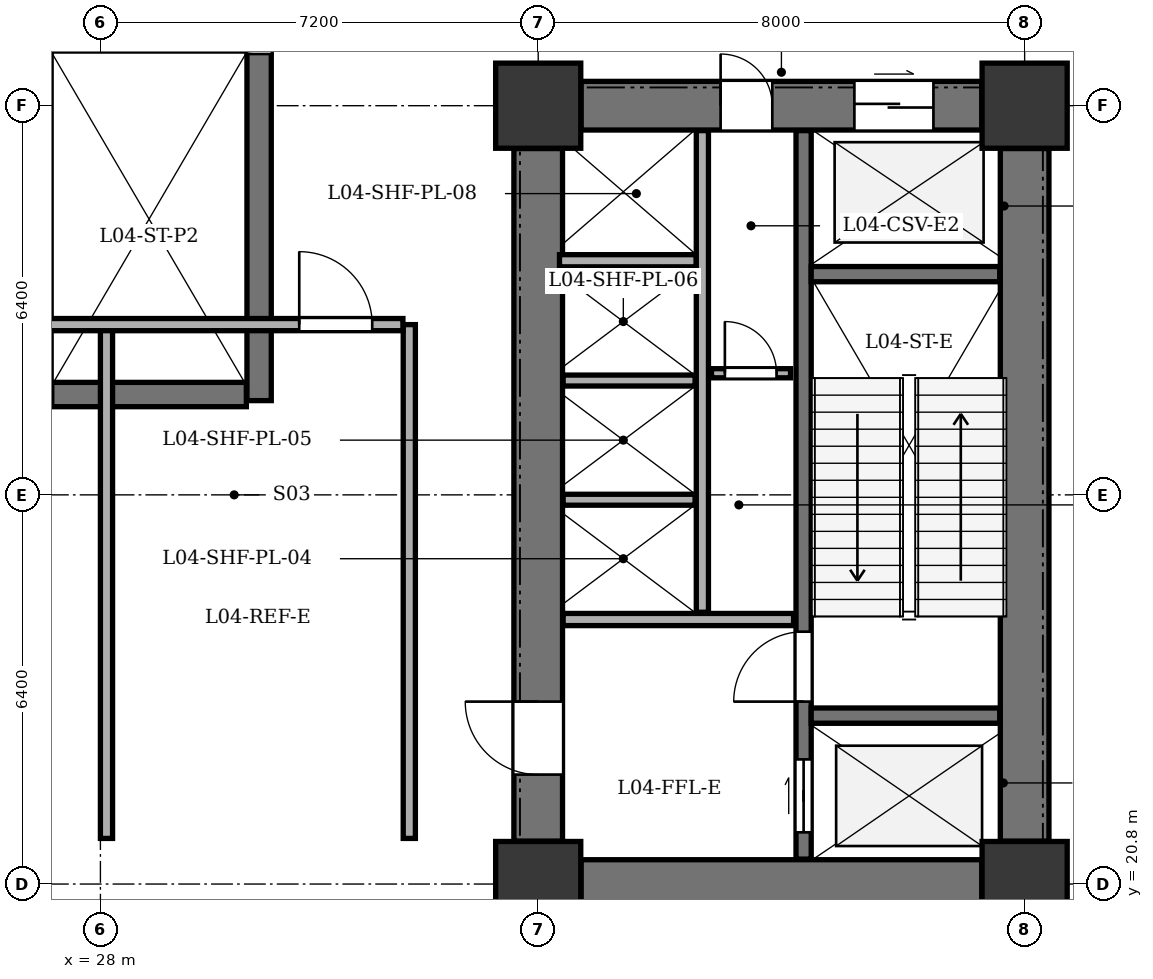
"""IFC4 building model, lengths in metres.
Left out: names, types, materials, properties, quantities, classifications, styles, units other than length and angle.
Written with IfcOpenShell. Run it as: python <this file> out.ifc"""

import sys

from ifc_helpers import new_model, si_unit, direction, frame, frame_2d, origin, origin_2d, place, context, subcontext, project, spatial, rectangle, extrude, element, fill, save


model = new_model("IFC4")
c1 = context("Model", 3, precision=1e-05, world=origin(), true_north=direction((0.0, 1.0)))
c2 = subcontext(c1, "Body", "Model", "MODEL_VIEW")
j1 = project(units=[si_unit("LENGTHUNIT", "METRE"), si_unit("PLANEANGLEUNIT", "RADIAN")], contexts=[c1])
p1 = place(None, origin())
s1 = spatial("IfcSite", under=j1, at=p1, CompositionType="ELEMENT")
p2 = place(p1, origin())
s2 = spatial("IfcBuilding", under=s1, at=p2, CompositionType="ELEMENT")
p3 = place(p2, frame((0.0, 0.0, 18.9)))
s3 = spatial("IfcBuildingStorey", under=s2, at=p3, CompositionType="ELEMENT", Elevation=18.9)
for number, where, z_axis, x_axis in (
    (1, (35.2, 20.8, 0.0), (0.0, 0.0, 1.0), (1.0, 0.0, 0.0)),
    (2, (43.2, 20.8, 0.0), (0.0, 0.0, 1.0), (1.0, 0.0, 0.0)),
    (3, (35.2, 33.6, 0.0), (0.0, 0.0, 1.0), (1.0, 0.0, 0.0)),
    (4, (43.2, 33.6, 0.0), (0.0, 0.0, 1.0), (1.0, 0.0, 0.0)),
):
    element("IfcColumn", number, at=place(p3, frame(where, z_axis=z_axis, x_axis=x_axis)), inside=s3, PredefinedType="COLUMN", context=c2, shape_type="SweptSolid", body=[
        extrude(rectangle(XDim=1.4, YDim=1.4, at=origin_2d()), origin(), (0.0, 0.0, 1.0), 5.4),
    ])
p4 = place(p3, frame((43.2, 21.505, 0.0), z_axis=(0.0, 0.0, 1.0), x_axis=(0.0, 1.0, 0.0)))
e5 = element("IfcWall", 5, at=p4, inside=s3, PredefinedType="SHEAR", context=c2, shape_type="SweptSolid", body=[
    extrude(rectangle(XDim=11.39, YDim=0.8, at=frame_2d((5.695, 0.0))), origin(), (0.0, 0.0, 1.0), 4.95),
])
p5 = place(p3, frame((35.905, 20.8, 0.0), z_axis=(0.0, 0.0, 1.0), x_axis=(1.0, 0.0, 0.0)))
e6 = element("IfcWall", 6, at=p5, inside=s3, PredefinedType="SHEAR", context=c2, shape_type="SweptSolid", body=[
    extrude(rectangle(XDim=6.59, YDim=0.8, at=frame_2d((3.295, 0.0))), origin(), (0.0, 0.0, 1.0), 4.95),
])
p6 = place(p3, frame((35.905, 33.6, 0.0), z_axis=(0.0, 0.0, 1.0), x_axis=(1.0, 0.0, 0.0)))
e7 = element("IfcWall", 7, at=p6, inside=s3, PredefinedType="SHEAR", context=c2, shape_type="SweptSolid", body=[
    extrude(rectangle(XDim=6.59, YDim=0.8, at=frame_2d((3.295, 0.0))), origin(), (0.0, 0.0, 1.0), 4.95),
])
p7 = place(p6, frame((4.495, 0.0, 0.0)))
e8 = element("IfcOpeningElement", 8, at=p7, cuts=e7, PredefinedType="OPENING", context=c2, shape_type="SweptSolid", body=[
    extrude(rectangle(XDim=1.3, YDim=2.15, at=frame_2d((0.65, 1.075))), frame((0.0, 0.41, 0.0), z_axis=(0.0, -1.0, 0.0), x_axis=(1.0, 0.0, 0.0)), (0.0, 0.0, 1.0), 0.82),
])
p8 = place(p6, frame((2.295, 0.0, 0.0)))
e9 = element("IfcOpeningElement", 9, at=p8, cuts=e7, PredefinedType="OPENING", context=c2, shape_type="SweptSolid", body=[
    extrude(rectangle(XDim=0.85, YDim=2.02, at=frame_2d((0.425, 1.01))), frame((0.0, 0.41, 0.0), z_axis=(0.0, -1.0, 0.0), x_axis=(1.0, 0.0, 0.0)), (0.0, 0.0, 1.0), 0.82),
])
p9 = place(p3, frame((35.2, 21.505, 0.0), z_axis=(0.0, 0.0, 1.0), x_axis=(0.0, 1.0, 0.0)))
e10 = element("IfcWall", 10, at=p9, inside=s3, PredefinedType="SHEAR", context=c2, shape_type="SweptSolid", body=[
    extrude(rectangle(XDim=11.39, YDim=0.8, at=frame_2d((5.695, 0.0))), origin(), (0.0, 0.0, 1.0), 4.95),
])
p10 = place(p9, frame((1.095, 0.0, 0.0)))
e11 = element("IfcOpeningElement", 11, at=p10, cuts=e10, PredefinedType="OPENING", context=c2, shape_type="SweptSolid", body=[
    extrude(rectangle(XDim=1.2, YDim=2.15, at=frame_2d((0.6, 1.075))), frame((0.0, 0.41, 0.0), z_axis=(0.0, -1.0, 0.0), x_axis=(1.0, 0.0, 0.0)), (0.0, 0.0, 1.0), 0.82),
])
p11 = place(p3, frame((39.565, 21.21, 0.0), z_axis=(0.0, 0.0, 1.0), x_axis=(0.0, 1.0, 0.0)))
e12 = element("IfcWall", 12, at=p11, inside=s3, PredefinedType="SHEAR", context=c2, shape_type="SweptSolid", body=[
    extrude(rectangle(XDim=11.98, YDim=0.25, at=frame_2d((5.99, 0.0))), origin(), (0.0, 0.0, 1.0), 4.95),
])
p12 = place(p11, frame((0.44, 0.0, 0.0)))
e13 = element("IfcOpeningElement", 13, at=p12, cuts=e12, PredefinedType="OPENING", context=c2, shape_type="SweptSolid", body=[
    extrude(rectangle(XDim=1.2, YDim=2.15, at=frame_2d((0.6, 1.075))), frame((0.0, 0.135, 0.0), z_axis=(0.0, -1.0, 0.0), x_axis=(1.0, 0.0, 0.0)), (0.0, 0.0, 1.0), 0.27),
])
p13 = place(p11, frame((2.59, 0.0, 0.0)))
e14 = element("IfcOpeningElement", 14, at=p13, cuts=e12, PredefinedType="OPENING", context=c2, shape_type="SweptSolid", body=[
    extrude(rectangle(XDim=1.15, YDim=2.15, at=frame_2d((0.575, 1.075))), frame((0.0, 0.135, 0.0), z_axis=(0.0, -1.0, 0.0), x_axis=(1.0, 0.0, 0.0)), (0.0, 0.0, 1.0), 0.27),
])
for number, where, z_axis, x_axis in (
    (15, (39.69, 23.57, 0.0), (0.0, 0.0, 1.0), (1.0, 0.0, 0.0)),
    (16, (39.69, 30.83, 0.0), (0.0, 0.0, 1.0), (1.0, 0.0, 0.0)),
):
    element("IfcWall", number, at=place(p3, frame(where, z_axis=z_axis, x_axis=x_axis)), inside=s3, PredefinedType="SHEAR", context=c2, shape_type="SweptSolid", body=[
        extrude(rectangle(XDim=3.1, YDim=0.25, at=frame_2d((1.55, 0.0))), origin(), (0.0, 0.0, 1.0), 4.95),
    ])
p14 = place(p3, frame((35.61, 25.15, 0.0), z_axis=(0.0, 0.0, 1.0), x_axis=(1.0, 0.0, 0.0)))
e17 = element("IfcWall", 17, at=p14, inside=s3, PredefinedType="SOLIDWALL", context=c2, shape_type="SweptSolid", body=[
    extrude(rectangle(XDim=3.79, YDim=0.2, at=frame_2d((1.895, 0.0))), origin(), (0.0, 0.0, 1.0), 4.95),
])
p15 = place(p3, frame((35.55, 31.05, 0.0), z_axis=(0.0, 0.0, 1.0), x_axis=(1.0, 0.0, 0.0)))
e18 = element("IfcWall", 18, at=p15, inside=s3, PredefinedType="SOLIDWALL", context=c2, shape_type="SweptSolid", body=[
    extrude(rectangle(XDim=2.25, YDim=0.2, at=frame_2d((1.125, 0.0))), origin(), (0.0, 0.0, 1.0), 4.95),
])
p16 = place(p3, frame((37.9, 25.27, 0.0), z_axis=(0.0, 0.0, 1.0), x_axis=(0.0, 1.0, 0.0)))
e19 = element("IfcWall", 19, at=p16, inside=s3, PredefinedType="SOLIDWALL", context=c2, shape_type="SweptSolid", body=[
    extrude(rectangle(XDim=7.92, YDim=0.2, at=frame_2d((3.96, 0.0))), origin(), (0.0, 0.0, 1.0), 4.95),
])
for number, where, z_axis, x_axis in (
    (20, (35.61, 27.12, 0.0), (0.0, 0.0, 1.0), (1.0, 0.0, 0.0)),
    (21, (35.61, 29.08, 0.0), (0.0, 0.0, 1.0), (1.0, 0.0, 0.0)),
):
    element("IfcWall", number, at=place(p3, frame(where, z_axis=z_axis, x_axis=x_axis)), inside=s3, PredefinedType="PARTITIONING", context=c2, shape_type="SweptSolid", body=[
        extrude(rectangle(XDim=2.17, YDim=0.18, at=frame_2d((1.085, 0.0))), origin(), (0.0, 0.0, 1.0), 4.95),
    ])
p17 = place(p3, frame((30.61, 28.75, 0.0), z_axis=(0.0, 0.0, 1.0), x_axis=(0.0, 1.0, 0.0)))
e22 = element("IfcWall", 22, at=p17, inside=s3, PredefinedType="SHEAR", context=c2, shape_type="SweptSolid", body=[
    extrude(rectangle(XDim=7.6, YDim=0.4, at=frame_2d((3.8, 0.0))), origin(), (0.0, 0.0, 1.0), 4.95),
])
p18 = place(p17, frame((5.7, 0.0, 0.0)))
e23 = element("IfcOpeningElement", 23, at=p18, cuts=e22, PredefinedType="OPENING", context=c2, shape_type="SweptSolid", body=[
    extrude(rectangle(XDim=1.15, YDim=2.15, at=frame_2d((0.575, 1.075))), frame((0.0, 0.21, 0.0), z_axis=(0.0, -1.0, 0.0), x_axis=(1.0, 0.0, 0.0)), (0.0, 0.0, 1.0), 0.42),
])
p19 = place(p3, frame((27.2, 28.85, 0.0), z_axis=(0.0, 0.0, 1.0), x_axis=(1.0, 0.0, 0.0)))
e24 = element("IfcWall", 24, at=p19, inside=s3, PredefinedType="SHEAR", context=c2, shape_type="SweptSolid", body=[
    extrude(rectangle(XDim=3.2, YDim=0.4, at=frame_2d((1.6, 0.0))), origin(), (0.0, 0.0, 1.0), 4.95),
])
p20 = place(p3, frame((38.05, 29.2, 0.0), z_axis=(0.0, 0.0, 1.0), x_axis=(1.0, 0.0, 0.0)))
e25 = element("IfcWall", 25, at=p20, inside=s3, PredefinedType="PARTITIONING", context=c2, shape_type="SweptSolid", body=[
    extrude(rectangle(XDim=1.3, YDim=0.15, at=frame_2d((0.65, 0.0))), origin(), (0.0, 0.0, 1.0), 4.95),
])
p21 = place(p20, frame((0.22, 0.0, 0.0)))
e26 = element("IfcOpeningElement", 26, at=p21, cuts=e25, PredefinedType="OPENING", context=c2, shape_type="SweptSolid", body=[
    extrude(rectangle(XDim=0.85, YDim=2.02, at=frame_2d((0.425, 1.01))), frame((0.0, 0.085, 0.0), z_axis=(0.0, -1.0, 0.0), x_axis=(1.0, 0.0, 0.0)), (0.0, 0.0, 1.0), 0.17),
])
p22 = place(p3, frame((33.08, 21.55, 0.0), z_axis=(0.0, 0.0, 1.0), x_axis=(0.0, 1.0, 0.0)))
e27 = element("IfcWall", 27, at=p22, inside=s3, PredefinedType="SOLIDWALL", context=c2, shape_type="SweptSolid", body=[
    extrude(rectangle(XDim=8.45, YDim=0.2, at=frame_2d((4.225, 0.0))), origin(), (0.0, 0.0, 1.0), 4.95),
])
p23 = place(p3, frame((28.1, 21.55, 0.0), z_axis=(0.0, 0.0, 1.0), x_axis=(0.0, 1.0, 0.0)))
e28 = element("IfcWall", 28, at=p23, inside=s3, PredefinedType="SOLIDWALL", context=c2, shape_type="SweptSolid", body=[
    extrude(rectangle(XDim=8.45, YDim=0.2, at=frame_2d((4.225, 0.0))), origin(), (0.0, 0.0, 1.0), 4.035),
])
p24 = place(p3, frame((23.225, 30.0, 0.0), z_axis=(0.0, 0.0, 1.0), x_axis=(1.0, 0.0, 0.0)))
e29 = element("IfcWall", 29, at=p24, inside=s3, PredefinedType="SOLIDWALL", context=c2, shape_type="SweptSolid", body=[
    extrude(rectangle(XDim=9.75, YDim=0.2, at=frame_2d((4.875, 0.0))), origin(), (0.0, 0.0, 1.0), 4.95),
])
p25 = place(p24, frame((1.295, 0.0, 0.0)))
e30 = element("IfcOpeningElement", 30, at=p25, cuts=e29, PredefinedType="OPENING", context=c2, shape_type="SweptSolid", body=[
    extrude(rectangle(XDim=1.2, YDim=2.15, at=frame_2d((0.6, 1.075))), frame((0.0, 0.11, 0.0), z_axis=(0.0, -1.0, 0.0), x_axis=(1.0, 0.0, 0.0)), (0.0, 0.0, 1.0), 0.22),
])
p26 = place(p24, frame((8.045, 0.0, 0.0)))
e31 = element("IfcOpeningElement", 31, at=p26, cuts=e29, PredefinedType="OPENING", context=c2, shape_type="SweptSolid", body=[
    extrude(rectangle(XDim=1.2, YDim=2.15, at=frame_2d((0.6, 1.075))), frame((0.0, 0.11, 0.0), z_axis=(0.0, -1.0, 0.0), x_axis=(1.0, 0.0, 0.0)), (0.0, 0.0, 1.0), 0.22),
])
p27 = place(p7, origin())
e32 = element("IfcDoor", 32, at=p27, inside=s3, OperationType="DOUBLE_DOOR_SLIDING", PredefinedType="DOOR", context=c2, shape_type="SweptSolid", body=[
    extrude(rectangle(XDim=1.3, YDim=2.15, at=frame_2d((0.65, 1.075))), frame((0.0, 0.025, 0.0), z_axis=(0.0, -1.0, 0.0), x_axis=(1.0, 0.0, 0.0)), (0.0, 0.0, 1.0), 0.05),
])
fill(e8, e32)
p28 = place(p8, origin())
e33 = element("IfcDoor", 33, at=p28, inside=s3, OperationType="SINGLE_SWING_LEFT", PredefinedType="DOOR", context=c2, shape_type="SweptSolid", body=[
    extrude(rectangle(XDim=0.85, YDim=2.02, at=frame_2d((0.425, 1.01))), frame((0.0, 0.025, 0.0), z_axis=(0.0, -1.0, 0.0), x_axis=(1.0, 0.0, 0.0)), (0.0, 0.0, 1.0), 0.05),
])
fill(e9, e33)
p29 = place(p10, origin())
e34 = element("IfcDoor", 34, at=p29, inside=s3, OperationType="SINGLE_SWING_RIGHT", PredefinedType="DOOR", context=c2, shape_type="SweptSolid", body=[
    extrude(rectangle(XDim=1.2, YDim=2.15, at=frame_2d((0.6, 1.075))), frame((0.0, 0.025, 0.0), z_axis=(0.0, -1.0, 0.0), x_axis=(1.0, 0.0, 0.0)), (0.0, 0.0, 1.0), 0.05),
])
fill(e11, e34)
p30 = place(p12, origin())
e35 = element("IfcDoor", 35, at=p30, inside=s3, OperationType="DOUBLE_DOOR_SLIDING", PredefinedType="DOOR", context=c2, shape_type="SweptSolid", body=[
    extrude(rectangle(XDim=1.2, YDim=2.15, at=frame_2d((0.6, 1.075))), frame((0.0, 0.025, 0.0), z_axis=(0.0, -1.0, 0.0), x_axis=(1.0, 0.0, 0.0)), (0.0, 0.0, 1.0), 0.05),
])
fill(e13, e35)
p31 = place(p13, origin())
e36 = element("IfcDoor", 36, at=p31, inside=s3, OperationType="SINGLE_SWING_LEFT", PredefinedType="DOOR", context=c2, shape_type="SweptSolid", body=[
    extrude(rectangle(XDim=1.15, YDim=2.15, at=frame_2d((0.575, 1.075))), frame((0.0, 0.025, 0.0), z_axis=(0.0, -1.0, 0.0), x_axis=(1.0, 0.0, 0.0)), (0.0, 0.0, 1.0), 0.05),
])
fill(e14, e36)
p32 = place(p18, origin())
e37 = element("IfcDoor", 37, at=p32, inside=s3, OperationType="SINGLE_SWING_RIGHT", PredefinedType="DOOR", context=c2, shape_type="SweptSolid", body=[
    extrude(rectangle(XDim=1.15, YDim=2.15, at=frame_2d((0.575, 1.075))), frame((0.0, 0.025, 0.0), z_axis=(0.0, -1.0, 0.0), x_axis=(1.0, 0.0, 0.0)), (0.0, 0.0, 1.0), 0.05),
])
fill(e23, e37)
p33 = place(p21, origin())
e38 = element("IfcDoor", 38, at=p33, inside=s3, OperationType="SINGLE_SWING_LEFT", PredefinedType="DOOR", context=c2, shape_type="SweptSolid", body=[
    extrude(rectangle(XDim=0.85, YDim=2.02, at=frame_2d((0.425, 1.01))), frame((0.0, 0.025, 0.0), z_axis=(0.0, -1.0, 0.0), x_axis=(1.0, 0.0, 0.0)), (0.0, 0.0, 1.0), 0.05),
])
fill(e26, e38)
p34 = place(p26, origin())
e39 = element("IfcDoor", 39, at=p34, inside=s3, OperationType="SINGLE_SWING_LEFT", PredefinedType="DOOR", context=c2, shape_type="SweptSolid", body=[
    extrude(rectangle(XDim=1.2, YDim=2.15, at=frame_2d((0.6, 1.075))), frame((0.0, 0.025, 0.0), z_axis=(0.0, -1.0, 0.0), x_axis=(1.0, 0.0, 0.0)), (0.0, 0.0, 1.0), 0.05),
])
fill(e31, e39)
save(model, sys.argv[1])
